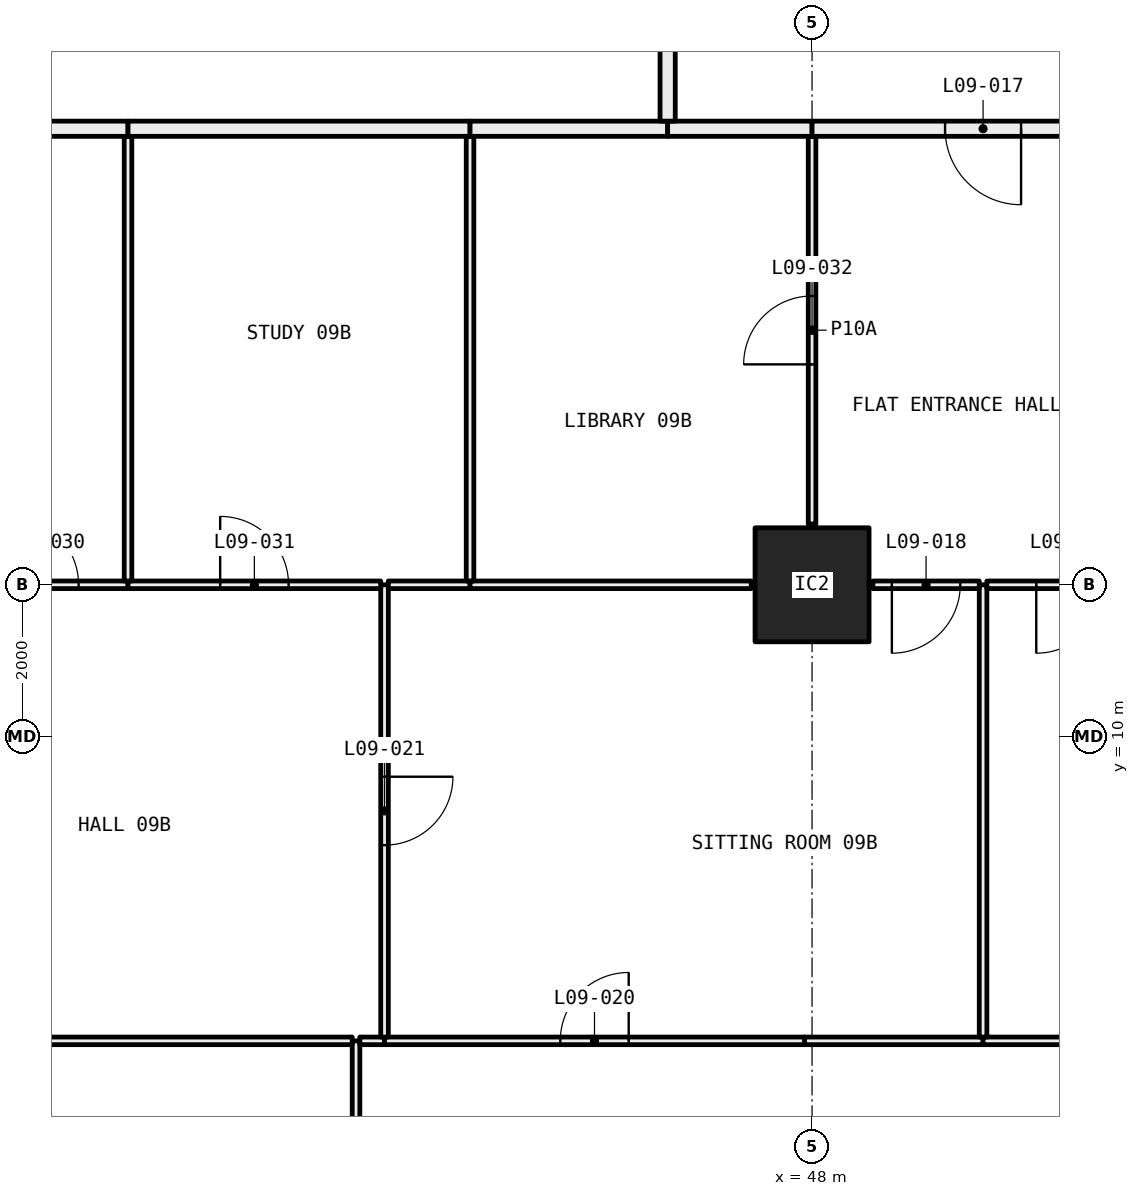
"""IFC4 building model, lengths in metres.
Left out: names, types, materials, properties, quantities, classifications, styles, units other than length and angle.
Written with IfcOpenShell. Run it as: python <this file> out.ifc"""

import sys

from ifc_helpers import new_model, si_unit, direction, frame, frame_2d, origin, origin_2d, place, context, subcontext, project, spatial, rectangle, hollow_rectangle, extrude, element, fill, save


model = new_model("IFC4")
c1 = context("Model", 3, precision=1e-05, world=origin(), true_north=direction((0.0, 1.0)))
c2 = subcontext(c1, "Body", "Model", "MODEL_VIEW")
j1 = project(units=[si_unit("LENGTHUNIT", "METRE"), si_unit("PLANEANGLEUNIT", "RADIAN")], contexts=[c1])
p1 = place(None, origin())
s1 = spatial("IfcSite", under=j1, at=p1, CompositionType="ELEMENT")
p2 = place(p1, origin())
s2 = spatial("IfcBuilding", under=s1, at=p2, CompositionType="ELEMENT")
p3 = place(p2, frame((0.0, 0.0, 43.8)))
s3 = spatial("IfcBuildingStorey", under=s2, at=p3, CompositionType="ELEMENT", Elevation=43.8)
p4 = place(p3, frame((48.0, 12.0, 0.0), z_axis=(0.0, 0.0, 1.0), x_axis=(1.0, 0.0, 0.0)))
e1 = element("IfcColumn", 1, at=p4, inside=s3, PredefinedType="COLUMN", context=c2, shape_type="SweptSolid", body=[
    extrude(hollow_rectangle(XDim=1.5, YDim=1.5, WallThickness=0.065, at=origin_2d()), origin(), (0.0, 0.0, 1.0), 3.05),
])
p5 = place(p3, frame((42.0, 0.72, 0.0), z_axis=(0.0, 0.0, 1.0), x_axis=(0.0, 1.0, 0.0)))
e2 = element("IfcWall", 2, at=p5, inside=s3, PredefinedType="PARTITIONING", context=c2, shape_type="SweptSolid", body=[
    extrude(rectangle(XDim=5.28, YDim=0.1, at=frame_2d((2.64, 0.0))), origin(), (0.0, 0.0, 1.0), 3.05),
])
p6 = place(p5, frame((2.19, 0.0, 0.0)))
e3 = element("IfcOpeningElement", 3, at=p6, cuts=e2, PredefinedType="OPENING", context=c2, shape_type="SweptSolid", body=[
    extrude(rectangle(XDim=0.9, YDim=2.1, at=frame_2d((0.45, 1.05))), frame((0.0, 0.06, 0.0), z_axis=(0.0, -1.0, 0.0), x_axis=(1.0, 0.0, 0.0)), (0.0, 0.0, 1.0), 0.12),
])
p7 = place(p3, frame((41.95, 6.0, 0.0), z_axis=(0.0, 0.0, 1.0), x_axis=(-1.0, 0.0, 0.0)))
e4 = element("IfcWall", 4, at=p7, inside=s3, PredefinedType="PARTITIONING", context=c2, shape_type="SweptSolid", body=[
    extrude(rectangle(XDim=5.9, YDim=0.1, at=frame_2d((2.95, 0.0))), origin(), (0.0, 0.0, 1.0), 2.45),
])
p8 = place(p3, frame((42.375, 6.0, 0.0), z_axis=(0.0, 0.0, 1.0), x_axis=(-1.0, 0.0, 0.0)))
e5 = element("IfcWall", 5, at=p8, inside=s3, PredefinedType="PARTITIONING", context=c2, shape_type="SweptSolid", body=[
    extrude(rectangle(XDim=0.325, YDim=0.1, at=frame_2d((0.163, 0.0))), origin(), (0.0, 0.0, 1.0), 3.05),
])
p9 = place(p3, frame((50.25, 6.0, 0.0), z_axis=(0.0, 0.0, 1.0), x_axis=(-1.0, 0.0, 0.0)))
e6 = element("IfcWall", 6, at=p9, inside=s3, PredefinedType="PARTITIONING", context=c2, shape_type="SweptSolid", body=[
    extrude(rectangle(XDim=2.35, YDim=0.1, at=frame_2d((1.175, 0.0))), origin(), (0.0, 0.0, 1.0), 2.45),
])
p10 = place(p3, frame((47.9, 6.0, 0.0), z_axis=(0.0, 0.0, 1.0), x_axis=(-1.0, 0.0, 0.0)))
e7 = element("IfcWall", 7, at=p10, inside=s3, PredefinedType="PARTITIONING", context=c2, shape_type="SweptSolid", body=[
    extrude(rectangle(XDim=5.525, YDim=0.1, at=frame_2d((2.762, 0.0))), origin(), (0.0, 0.0, 1.0), 3.05),
])
p11 = place(p10, frame((2.312, 0.0, 0.0)))
e8 = element("IfcOpeningElement", 8, at=p11, cuts=e7, PredefinedType="OPENING", context=c2, shape_type="SweptSolid", body=[
    extrude(rectangle(XDim=0.9, YDim=2.1, at=frame_2d((0.45, 1.05))), frame((0.0, 0.06, 0.0), z_axis=(0.0, -1.0, 0.0), x_axis=(1.0, 0.0, 0.0)), (0.0, 0.0, 1.0), 0.12),
])
p12 = place(p3, frame((53.95, 6.0, 0.0), z_axis=(0.0, 0.0, 1.0), x_axis=(-1.0, 0.0, 0.0)))
e9 = element("IfcWall", 9, at=p12, inside=s3, PredefinedType="PARTITIONING", context=c2, shape_type="SweptSolid", body=[
    extrude(rectangle(XDim=3.7, YDim=0.1, at=frame_2d((1.85, 0.0))), origin(), (0.0, 0.0, 1.0), 3.05),
])
p13 = place(p3, frame((42.375, 6.05, 0.0), z_axis=(0.0, 0.0, 1.0), x_axis=(0.0, 1.0, 0.0)))
e10 = element("IfcWall", 10, at=p13, inside=s3, PredefinedType="PARTITIONING", context=c2, shape_type="SweptSolid", body=[
    extrude(rectangle(XDim=5.95, YDim=0.1, at=frame_2d((2.975, 0.0))), origin(), (0.0, 0.0, 1.0), 2.45),
])
p14 = place(p13, frame((2.525, 0.0, 0.0)))
e11 = element("IfcOpeningElement", 11, at=p14, cuts=e10, PredefinedType="OPENING", context=c2, shape_type="SweptSolid", body=[
    extrude(rectangle(XDim=0.9, YDim=2.1, at=frame_2d((0.45, 1.05))), frame((0.0, 0.06, 0.0), z_axis=(0.0, -1.0, 0.0), x_axis=(1.0, 0.0, 0.0)), (0.0, 0.0, 1.0), 0.12),
])
p15 = place(p3, frame((39.0, 12.0, 0.0), z_axis=(0.0, 0.0, 1.0), x_axis=(-1.0, 0.0, 0.0)))
e12 = element("IfcWall", 12, at=p15, inside=s3, PredefinedType="PARTITIONING", context=c2, shape_type="SweptSolid", body=[
    extrude(rectangle(XDim=2.2, YDim=0.1, at=frame_2d((1.1, 0.0))), origin(), (0.0, 0.0, 1.0), 2.45),
])
p16 = place(p15, frame((0.65, 0.0, 0.0)))
e13 = element("IfcOpeningElement", 13, at=p16, cuts=e12, PredefinedType="OPENING", context=c2, shape_type="SweptSolid", body=[
    extrude(rectangle(XDim=0.9, YDim=2.1, at=frame_2d((0.45, 1.05))), frame((0.0, 0.06, 0.0), z_axis=(0.0, -1.0, 0.0), x_axis=(1.0, 0.0, 0.0)), (0.0, 0.0, 1.0), 0.12),
])
p17 = place(p3, frame((42.325, 12.0, 0.0), z_axis=(0.0, 0.0, 1.0), x_axis=(-1.0, 0.0, 0.0)))
e14 = element("IfcWall", 14, at=p17, inside=s3, PredefinedType="PARTITIONING", context=c2, shape_type="SweptSolid", body=[
    extrude(rectangle(XDim=3.325, YDim=0.1, at=frame_2d((1.663, 0.0))), origin(), (0.0, 0.0, 1.0), 2.45),
])
p18 = place(p17, frame((1.212, 0.0, 0.0)))
e15 = element("IfcOpeningElement", 15, at=p18, cuts=e14, PredefinedType="OPENING", context=c2, shape_type="SweptSolid", body=[
    extrude(rectangle(XDim=0.9, YDim=2.1, at=frame_2d((0.45, 1.05))), frame((0.0, 0.06, 0.0), z_axis=(0.0, -1.0, 0.0), x_axis=(1.0, 0.0, 0.0)), (0.0, 0.0, 1.0), 0.12),
])
p19 = place(p3, frame((50.25, 6.05, 0.0), z_axis=(0.0, 0.0, 1.0), x_axis=(0.0, 1.0, 0.0)))
e16 = element("IfcWall", 16, at=p19, inside=s3, PredefinedType="PARTITIONING", context=c2, shape_type="SweptSolid", body=[
    extrude(rectangle(XDim=5.95, YDim=0.1, at=frame_2d((2.975, 0.0))), origin(), (0.0, 0.0, 1.0), 2.45),
])
p20 = place(p3, frame((43.5, 12.0, 0.0), z_axis=(0.0, 0.0, 1.0), x_axis=(-1.0, 0.0, 0.0)))
e17 = element("IfcWall", 17, at=p20, inside=s3, PredefinedType="PARTITIONING", context=c2, shape_type="SweptSolid", body=[
    extrude(rectangle(XDim=1.075, YDim=0.1, at=frame_2d((0.538, 0.0))), origin(), (0.0, 0.0, 1.0), 2.45),
])
p21 = place(p3, frame((47.2, 12.0, 0.0), z_axis=(0.0, 0.0, 1.0), x_axis=(-1.0, 0.0, 0.0)))
e18 = element("IfcWall", 18, at=p21, inside=s3, PredefinedType="PARTITIONING", context=c2, shape_type="SweptSolid", body=[
    extrude(rectangle(XDim=3.7, YDim=0.1, at=frame_2d((1.85, 0.0))), origin(), (0.0, 0.0, 1.0), 2.45),
])
p22 = place(p3, frame((50.2, 12.0, 0.0), z_axis=(0.0, 0.0, 1.0), x_axis=(-1.0, 0.0, 0.0)))
e19 = element("IfcWall", 19, at=p22, inside=s3, PredefinedType="PARTITIONING", context=c2, shape_type="SweptSolid", body=[
    extrude(rectangle(XDim=1.4, YDim=0.1, at=frame_2d((0.7, 0.0))), origin(), (0.0, 0.0, 1.0), 2.45),
])
p23 = place(p22, frame((0.25, 0.0, 0.0)))
e20 = element("IfcOpeningElement", 20, at=p23, cuts=e19, PredefinedType="OPENING", context=c2, shape_type="SweptSolid", body=[
    extrude(rectangle(XDim=0.9, YDim=2.1, at=frame_2d((0.45, 1.05))), frame((0.0, 0.06, 0.0), z_axis=(0.0, -1.0, 0.0), x_axis=(1.0, 0.0, 0.0)), (0.0, 0.0, 1.0), 0.12),
])
p24 = place(p3, frame((52.5, 12.0, 0.0), z_axis=(0.0, 0.0, 1.0), x_axis=(-1.0, 0.0, 0.0)))
e21 = element("IfcWall", 21, at=p24, inside=s3, PredefinedType="PARTITIONING", context=c2, shape_type="SweptSolid", body=[
    extrude(rectangle(XDim=2.2, YDim=0.1, at=frame_2d((1.1, 0.0))), origin(), (0.0, 0.0, 1.0), 2.45),
])
p25 = place(p24, frame((0.65, 0.0, 0.0)))
e22 = element("IfcOpeningElement", 22, at=p25, cuts=e21, PredefinedType="OPENING", context=c2, shape_type="SweptSolid", body=[
    extrude(rectangle(XDim=0.9, YDim=2.1, at=frame_2d((0.45, 1.05))), frame((0.0, 0.06, 0.0), z_axis=(0.0, -1.0, 0.0), x_axis=(1.0, 0.0, 0.0)), (0.0, 0.0, 1.0), 0.12),
])
p26 = place(p3, frame((39.0, 12.05, 0.0), z_axis=(0.0, 0.0, 1.0), x_axis=(0.0, 1.0, 0.0)))
e23 = element("IfcWall", 23, at=p26, inside=s3, PredefinedType="PARTITIONING", context=c2, shape_type="SweptSolid", body=[
    extrude(rectangle(XDim=5.85, YDim=0.1, at=frame_2d((2.925, 0.0))), origin(), (0.0, 0.0, 1.0), 2.45),
])
p27 = place(p3, frame((39.0, 18.0, 0.0), z_axis=(0.0, 0.0, 1.0), x_axis=(-1.0, 0.0, 0.0)))
e24 = element("IfcWall", 24, at=p27, inside=s3, PredefinedType="PARTITIONING", context=c2, shape_type="SweptSolid", body=[
    extrude(rectangle(XDim=3.0, YDim=0.2, at=frame_2d((1.5, 0.0))), origin(), (0.0, 0.0, 1.0), 2.45),
])
p28 = place(p3, frame((43.5, 12.05, 0.0), z_axis=(0.0, 0.0, 1.0), x_axis=(0.0, 1.0, 0.0)))
e25 = element("IfcWall", 25, at=p28, inside=s3, PredefinedType="PARTITIONING", context=c2, shape_type="SweptSolid", body=[
    extrude(rectangle(XDim=5.85, YDim=0.1, at=frame_2d((2.925, 0.0))), origin(), (0.0, 0.0, 1.0), 2.45),
])
p29 = place(p3, frame((43.5, 18.0, 0.0), z_axis=(0.0, 0.0, 1.0), x_axis=(-1.0, 0.0, 0.0)))
e26 = element("IfcWall", 26, at=p29, inside=s3, PredefinedType="PARTITIONING", context=c2, shape_type="SweptSolid", body=[
    extrude(rectangle(XDim=4.5, YDim=0.2, at=frame_2d((2.25, 0.0))), origin(), (0.0, 0.0, 1.0), 3.05),
])
p30 = place(p3, frame((48.0, 12.8, 0.0), z_axis=(0.0, 0.0, 1.0), x_axis=(0.0, 1.0, 0.0)))
e27 = element("IfcWall", 27, at=p30, inside=s3, PredefinedType="PARTITIONING", context=c2, shape_type="SweptSolid", body=[
    extrude(rectangle(XDim=5.1, YDim=0.1, at=frame_2d((2.55, 0.0))), origin(), (0.0, 0.0, 1.0), 3.05),
])
p31 = place(p30, frame((2.1, 0.0, 0.0)))
e28 = element("IfcOpeningElement", 28, at=p31, cuts=e27, PredefinedType="OPENING", context=c2, shape_type="SweptSolid", body=[
    extrude(rectangle(XDim=0.9, YDim=2.1, at=frame_2d((0.45, 1.05))), frame((0.0, 0.06, 0.0), z_axis=(0.0, -1.0, 0.0), x_axis=(1.0, 0.0, 0.0)), (0.0, 0.0, 1.0), 0.12),
])
p32 = place(p3, frame((46.1, 18.0, 0.0), z_axis=(0.0, 0.0, 1.0), x_axis=(-1.0, 0.0, 0.0)))
e29 = element("IfcWall", 29, at=p32, inside=s3, PredefinedType="PARTITIONING", context=c2, shape_type="SweptSolid", body=[
    extrude(rectangle(XDim=2.6, YDim=0.2, at=frame_2d((1.3, 0.0))), origin(), (0.0, 0.0, 1.0), 3.05),
])
p33 = place(p3, frame((48.0, 18.0, 0.0), z_axis=(0.0, 0.0, 1.0), x_axis=(-1.0, 0.0, 0.0)))
e30 = element("IfcWall", 30, at=p33, inside=s3, PredefinedType="PARTITIONING", context=c2, shape_type="SweptSolid", body=[
    extrude(rectangle(XDim=1.9, YDim=0.2, at=frame_2d((0.95, 0.0))), origin(), (0.0, 0.0, 1.0), 3.05),
])
p34 = place(p3, frame((52.5, 18.0, 0.0), z_axis=(0.0, 0.0, 1.0), x_axis=(-1.0, 0.0, 0.0)))
e31 = element("IfcWall", 31, at=p34, inside=s3, PredefinedType="PARTITIONING", context=c2, shape_type="SweptSolid", body=[
    extrude(rectangle(XDim=4.5, YDim=0.2, at=frame_2d((2.25, 0.0))), origin(), (0.0, 0.0, 1.0), 3.05),
])
p35 = place(p34, frame((1.75, 0.0, 0.0)))
e32 = element("IfcOpeningElement", 32, at=p35, cuts=e31, PredefinedType="OPENING", context=c2, shape_type="SweptSolid", body=[
    extrude(rectangle(XDim=1.0, YDim=2.1, at=frame_2d((0.5, 1.05))), frame((0.0, 0.11, 0.0), z_axis=(0.0, -1.0, 0.0), x_axis=(1.0, 0.0, 0.0)), (0.0, 0.0, 1.0), 0.22),
])
p36 = place(p3, frame((46.1, 18.1, 0.0), z_axis=(0.0, 0.0, 1.0), x_axis=(0.0, 1.0, 0.0)))
e33 = element("IfcWall", 33, at=p36, inside=s3, PredefinedType="PARTITIONING", context=c2, shape_type="SweptSolid", body=[
    extrude(rectangle(XDim=6.2, YDim=0.2, at=frame_2d((3.1, 0.0))), origin(), (0.0, 0.0, 1.0), 2.45),
])
p37 = place(p35, origin())
e34 = element("IfcDoor", 34, at=p37, inside=s3, OperationType="SINGLE_SWING_RIGHT", PredefinedType="DOOR", context=c2, shape_type="SweptSolid", body=[
    extrude(rectangle(XDim=1.0, YDim=2.1, at=frame_2d((0.5, 1.05))), frame((0.0, 0.025, 0.0), z_axis=(0.0, -1.0, 0.0), x_axis=(1.0, 0.0, 0.0)), (0.0, 0.0, 1.0), 0.05),
])
fill(e32, e34)
p38 = place(p23, origin())
e35 = element("IfcDoor", 35, at=p38, inside=s3, OperationType="SINGLE_SWING_LEFT", PredefinedType="DOOR", context=c2, shape_type="SweptSolid", body=[
    extrude(rectangle(XDim=0.9, YDim=2.1, at=frame_2d((0.45, 1.05))), frame((0.0, 0.025, 0.0), z_axis=(0.0, -1.0, 0.0), x_axis=(1.0, 0.0, 0.0)), (0.0, 0.0, 1.0), 0.05),
])
fill(e20, e35)
p39 = place(p25, origin())
e36 = element("IfcDoor", 36, at=p39, inside=s3, OperationType="SINGLE_SWING_LEFT", PredefinedType="DOOR", context=c2, shape_type="SweptSolid", body=[
    extrude(rectangle(XDim=0.9, YDim=2.1, at=frame_2d((0.45, 1.05))), frame((0.0, 0.025, 0.0), z_axis=(0.0, -1.0, 0.0), x_axis=(1.0, 0.0, 0.0)), (0.0, 0.0, 1.0), 0.05),
])
fill(e22, e36)
p40 = place(p11, frame((0.9, 0.0, 0.0), x_axis=(-1.0, 0.0, 0.0)))
e37 = element("IfcDoor", 37, at=p40, inside=s3, OperationType="SINGLE_SWING_LEFT", PredefinedType="DOOR", context=c2, shape_type="SweptSolid", body=[
    extrude(rectangle(XDim=0.9, YDim=2.1, at=frame_2d((0.45, 1.05))), frame((0.0, 0.025, 0.0), z_axis=(0.0, -1.0, 0.0), x_axis=(1.0, 0.0, 0.0)), (0.0, 0.0, 1.0), 0.05),
])
fill(e8, e37)
p41 = place(p14, frame((0.9, 0.0, 0.0), x_axis=(-1.0, 0.0, 0.0)))
e38 = element("IfcDoor", 38, at=p41, inside=s3, OperationType="SINGLE_SWING_RIGHT", PredefinedType="DOOR", context=c2, shape_type="SweptSolid", body=[
    extrude(rectangle(XDim=0.9, YDim=2.1, at=frame_2d((0.45, 1.05))), frame((0.0, 0.025, 0.0), z_axis=(0.0, -1.0, 0.0), x_axis=(1.0, 0.0, 0.0)), (0.0, 0.0, 1.0), 0.05),
])
fill(e11, e38)
p42 = place(p16, frame((0.9, 0.0, 0.0), x_axis=(-1.0, 0.0, 0.0)))
e39 = element("IfcDoor", 39, at=p42, inside=s3, OperationType="SINGLE_SWING_RIGHT", PredefinedType="DOOR", context=c2, shape_type="SweptSolid", body=[
    extrude(rectangle(XDim=0.9, YDim=2.1, at=frame_2d((0.45, 1.05))), frame((0.0, 0.025, 0.0), z_axis=(0.0, -1.0, 0.0), x_axis=(1.0, 0.0, 0.0)), (0.0, 0.0, 1.0), 0.05),
])
fill(e13, e39)
p43 = place(p18, frame((0.9, 0.0, 0.0), x_axis=(-1.0, 0.0, 0.0)))
e40 = element("IfcDoor", 40, at=p43, inside=s3, OperationType="SINGLE_SWING_RIGHT", PredefinedType="DOOR", context=c2, shape_type="SweptSolid", body=[
    extrude(rectangle(XDim=0.9, YDim=2.1, at=frame_2d((0.45, 1.05))), frame((0.0, 0.025, 0.0), z_axis=(0.0, -1.0, 0.0), x_axis=(1.0, 0.0, 0.0)), (0.0, 0.0, 1.0), 0.05),
])
fill(e15, e40)
p44 = place(p31, origin())
e41 = element("IfcDoor", 41, at=p44, inside=s3, OperationType="SINGLE_SWING_RIGHT", PredefinedType="DOOR", context=c2, shape_type="SweptSolid", body=[
    extrude(rectangle(XDim=0.9, YDim=2.1, at=frame_2d((0.45, 1.05))), frame((0.0, 0.025, 0.0), z_axis=(0.0, -1.0, 0.0), x_axis=(1.0, 0.0, 0.0)), (0.0, 0.0, 1.0), 0.05),
])
fill(e28, e41)
save(model, sys.argv[1])
